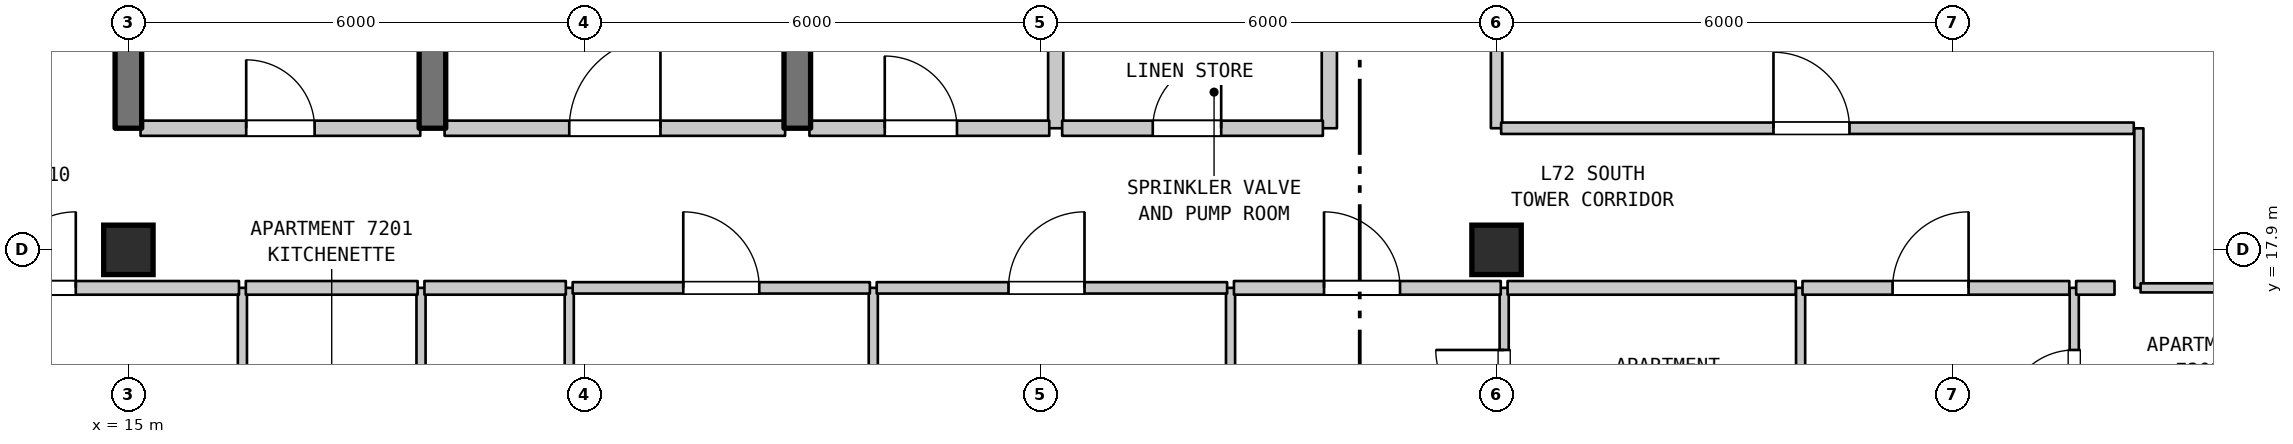
"""IFC4 building model, lengths in metres.
Left out: names, types, materials, properties, quantities, classifications, styles, units other than length and angle.
Written with IfcOpenShell. Run it as: python <this file> out.ifc"""

import sys

from ifc_helpers import new_model, si_unit, direction, frame, frame_2d, origin, origin_2d, place, context, subcontext, project, spatial, rectangle, extrude, element, fill, save


model = new_model("IFC4")
c1 = context("Model", 3, precision=1e-05, world=origin(), true_north=direction((0.0, 1.0)))
c2 = subcontext(c1, "Body", "Model", "MODEL_VIEW")
j1 = project(units=[si_unit("LENGTHUNIT", "METRE"), si_unit("PLANEANGLEUNIT", "RADIAN")], contexts=[c1])
p1 = place(None, origin())
s1 = spatial("IfcSite", under=j1, at=p1, CompositionType="ELEMENT")
p2 = place(p1, origin())
s2 = spatial("IfcBuilding", under=s1, at=p2, CompositionType="ELEMENT")
p3 = place(p2, frame((0.0, 0.0, 288.0)))
s3 = spatial("IfcBuildingStorey", under=s2, at=p3, CompositionType="ELEMENT", Elevation=288.0)
for number, where, z_axis, x_axis in (
    (1, (15.0, 17.9, 0.0), (0.0, 0.0, 1.0), (1.0, 0.0, 0.0)),
    (2, (33.0, 17.9, 0.0), (0.0, 0.0, 1.0), (1.0, 0.0, 0.0)),
):
    element("IfcColumn", number, at=place(p3, frame(where, z_axis=z_axis, x_axis=x_axis)), inside=s3, PredefinedType="COLUMN", context=c2, shape_type="SweptSolid", body=[
        extrude(rectangle(XDim=0.65, YDim=0.65, at=origin_2d()), origin(), (0.0, 0.0, 1.0), 3.7),
    ])
p4 = place(p3, frame((15.0, 19.5, 0.0), z_axis=(0.0, 0.0, 1.0), x_axis=(0.0, 1.0, 0.0)))
e3 = element("IfcWall", 3, at=p4, inside=s3, PredefinedType="SHEAR", context=c2, shape_type="SweptSolid", body=[
    extrude(rectangle(XDim=3.2, YDim=0.35, at=frame_2d((1.6, 0.0))), origin(), (0.0, 0.0, 1.0), 3.39),
])
p5 = place(p3, frame((16.5, 14.2, 0.0), z_axis=(0.0, 0.0, 1.0), x_axis=(0.0, 1.0, 0.0)))
e4 = element("IfcWall", 4, at=p5, inside=s3, PredefinedType="PARTITIONING", context=c2, shape_type="SweptSolid", body=[
    extrude(rectangle(XDim=3.2, YDim=0.12, at=frame_2d((1.6, 0.0))), origin(), (0.0, 0.0, 1.0), 3.39),
])
p6 = place(p5, frame((1.15, 0.0, 0.0)))
e5 = element("IfcOpeningElement", 5, at=p6, cuts=e4, PredefinedType="OPENING", context=c2, shape_type="SweptSolid", body=[
    extrude(rectangle(XDim=0.9, YDim=2.15, at=frame_2d((0.45, 1.075))), frame((0.0, 0.07, 0.0), z_axis=(0.0, -1.0, 0.0), x_axis=(1.0, 0.0, 0.0)), (0.0, 0.0, 1.0), 0.14),
])
p7 = place(p3, frame((18.85, 14.2, 0.0), z_axis=(0.0, 0.0, 1.0), x_axis=(0.0, 1.0, 0.0)))
e6 = element("IfcWall", 6, at=p7, inside=s3, PredefinedType="PARTITIONING", context=c2, shape_type="SweptSolid", body=[
    extrude(rectangle(XDim=3.2, YDim=0.12, at=frame_2d((1.6, 0.0))), origin(), (0.0, 0.0, 1.0), 3.39),
])
p8 = place(p3, frame((19.0, 19.5, 0.0), z_axis=(0.0, 0.0, 1.0), x_axis=(0.0, 1.0, 0.0)))
e7 = element("IfcWall", 7, at=p8, inside=s3, PredefinedType="SHEAR", context=c2, shape_type="SweptSolid", body=[
    extrude(rectangle(XDim=3.2, YDim=0.35, at=frame_2d((1.6, 0.0))), origin(), (0.0, 0.0, 1.0), 3.39),
])
p9 = place(p3, frame((20.8, 7.075, 0.0), z_axis=(0.0, 0.0, 1.0), x_axis=(0.0, 1.0, 0.0)))
e8 = element("IfcWall", 8, at=p9, inside=s3, PredefinedType="PARTITIONING", context=c2, shape_type="SweptSolid", body=[
    extrude(rectangle(XDim=10.325, YDim=0.12, at=frame_2d((5.163, 0.0))), origin(), (0.0, 0.0, 1.0), 3.39),
])
p10 = place(p3, frame((23.8, 19.5, 0.0), z_axis=(0.0, 0.0, 1.0), x_axis=(0.0, 1.0, 0.0)))
e9 = element("IfcWall", 9, at=p10, inside=s3, PredefinedType="SHEAR", context=c2, shape_type="SweptSolid", body=[
    extrude(rectangle(XDim=3.2, YDim=0.35, at=frame_2d((1.6, 0.0))), origin(), (0.0, 0.0, 1.0), 3.39),
])
p11 = place(p3, frame((24.8, 6.71, 0.0), z_axis=(0.0, 0.0, 1.0), x_axis=(0.0, 1.0, 0.0)))
e10 = element("IfcWall", 10, at=p11, inside=s3, PredefinedType="PARTITIONING", context=c2, shape_type="SweptSolid", body=[
    extrude(rectangle(XDim=10.69, YDim=0.12, at=frame_2d((5.345, 0.0))), origin(), (0.0, 0.0, 1.0), 3.39),
])
p12 = place(p3, frame((27.2, 19.5, 0.0), z_axis=(0.0, 0.0, 1.0), x_axis=(0.0, 1.0, 0.0)))
e11 = element("IfcWall", 11, at=p12, inside=s3, PredefinedType="STANDARD", context=c2, shape_type="SweptSolid", body=[
    extrude(rectangle(XDim=1.6, YDim=0.2, at=frame_2d((0.8, 0.0))), origin(), (0.0, 0.0, 1.0), 3.39),
])
p13 = place(p3, frame((29.5, 6.71, 0.0), z_axis=(0.0, 0.0, 1.0), x_axis=(0.0, 1.0, 0.0)))
e12 = element("IfcWall", 12, at=p13, inside=s3, PredefinedType="PARTITIONING", context=c2, shape_type="SweptSolid", body=[
    extrude(rectangle(XDim=10.69, YDim=0.12, at=frame_2d((5.345, 0.0))), origin(), (0.0, 0.0, 1.0), 3.39),
])
p14 = place(p3, frame((30.8, 19.5, 0.0), z_axis=(0.0, 0.0, 1.0), x_axis=(0.0, 1.0, 0.0)))
e13 = element("IfcWall", 13, at=p14, inside=s3, PredefinedType="STANDARD", context=c2, shape_type="SweptSolid", body=[
    extrude(rectangle(XDim=1.6, YDim=0.2, at=frame_2d((0.8, 0.0))), origin(), (0.0, 0.0, 1.0), 3.39),
])
p15 = place(p3, frame((33.0, 19.5, 0.0), z_axis=(0.0, 0.0, 1.0), x_axis=(0.0, 1.0, 0.0)))
e14 = element("IfcWall", 14, at=p15, inside=s3, PredefinedType="STANDARD", context=c2, shape_type="SweptSolid", body=[
    extrude(rectangle(XDim=8.4, YDim=0.15, at=frame_2d((4.2, 0.0))), origin(), (0.0, 0.0, 1.0), 3.1),
])
p16 = place(p3, frame((33.1, 15.008, 0.0), z_axis=(0.0, 0.0, 1.0), x_axis=(0.0, 1.0, 0.0)))
e15 = element("IfcWall", 15, at=p16, inside=s3, PredefinedType="PARTITIONING", context=c2, shape_type="SweptSolid", body=[
    extrude(rectangle(XDim=2.392, YDim=0.12, at=frame_2d((1.196, 0.0))), origin(), (0.0, 0.0, 1.0), 3.1),
])
p17 = place(p16, frame((0.675, 0.0, 0.0)))
e16 = element("IfcOpeningElement", 16, at=p17, cuts=e15, PredefinedType="OPENING", context=c2, shape_type="SweptSolid", body=[
    extrude(rectangle(XDim=0.9, YDim=2.1, at=frame_2d((0.45, 1.05))), frame((0.0, 0.07, 0.0), z_axis=(0.0, -1.0, 0.0), x_axis=(1.0, 0.0, 0.0)), (0.0, 0.0, 1.0), 0.14),
])
p18 = place(p3, frame((37.0, 15.008, 0.0), z_axis=(0.0, 0.0, 1.0), x_axis=(0.0, 1.0, 0.0)))
e17 = element("IfcWall", 17, at=p18, inside=s3, PredefinedType="PARTITIONING", context=c2, shape_type="SweptSolid", body=[
    extrude(rectangle(XDim=2.392, YDim=0.12, at=frame_2d((1.196, 0.0))), origin(), (0.0, 0.0, 1.0), 3.39),
])
p19 = place(p3, frame((40.6, 15.008, 0.0), z_axis=(0.0, 0.0, 1.0), x_axis=(0.0, 1.0, 0.0)))
e18 = element("IfcWall", 18, at=p19, inside=s3, PredefinedType="PARTITIONING", context=c2, shape_type="SweptSolid", body=[
    extrude(rectangle(XDim=2.392, YDim=0.12, at=frame_2d((1.196, 0.0))), origin(), (0.0, 0.0, 1.0), 3.39),
])
p20 = place(p19, frame((0.675, 0.0, 0.0)))
e19 = element("IfcOpeningElement", 19, at=p20, cuts=e18, PredefinedType="OPENING", context=c2, shape_type="SweptSolid", body=[
    extrude(rectangle(XDim=0.9, YDim=2.1, at=frame_2d((0.45, 1.05))), frame((0.0, 0.07, 0.0), z_axis=(0.0, -1.0, 0.0), x_axis=(1.0, 0.0, 0.0)), (0.0, 0.0, 1.0), 0.14),
])
p21 = place(p3, frame((41.45, 17.4, 0.0), z_axis=(0.0, 0.0, 1.0), x_axis=(0.0, 1.0, 0.0)))
e20 = element("IfcWall", 20, at=p21, inside=s3, PredefinedType="PARTITIONING", context=c2, shape_type="SweptSolid", body=[
    extrude(rectangle(XDim=2.099, YDim=0.12, at=frame_2d((1.05, 0.0))), origin(), (0.0, 0.0, 1.0), 3.39),
])
p22 = place(p3, frame((12.975, 17.4, 0.0), z_axis=(0.0, 0.0, 1.0), x_axis=(1.0, 0.0, 0.0)))
e21 = element("IfcWall", 21, at=p22, inside=s3, PredefinedType="STANDARD", context=c2, shape_type="SweptSolid", body=[
    extrude(rectangle(XDim=3.48, YDim=0.18, at=frame_2d((1.74, 0.0))), origin(), (0.0, 0.0, 1.0), 3.39),
])
p23 = place(p22, frame((0.333, 0.0, 0.0)))
e22 = element("IfcOpeningElement", 22, at=p23, cuts=e21, PredefinedType="OPENING", context=c2, shape_type="SweptSolid", body=[
    extrude(rectangle(XDim=1.0, YDim=2.15, at=frame_2d((0.5, 1.075))), frame((0.0, 0.1, 0.0), z_axis=(0.0, -1.0, 0.0), x_axis=(1.0, 0.0, 0.0)), (0.0, 0.0, 1.0), 0.2),
])
p24 = place(p3, frame((16.545, 17.4, 0.0), z_axis=(0.0, 0.0, 1.0), x_axis=(1.0, 0.0, 0.0)))
e23 = element("IfcWall", 23, at=p24, inside=s3, PredefinedType="STANDARD", context=c2, shape_type="SweptSolid", body=[
    extrude(rectangle(XDim=2.26, YDim=0.18, at=frame_2d((1.13, 0.0))), origin(), (0.0, 0.0, 1.0), 3.39),
])
p25 = place(p3, frame((18.895, 17.4, 0.0), z_axis=(0.0, 0.0, 1.0), x_axis=(1.0, 0.0, 0.0)))
e24 = element("IfcWall", 24, at=p25, inside=s3, PredefinedType="STANDARD", context=c2, shape_type="SweptSolid", body=[
    extrude(rectangle(XDim=1.86, YDim=0.18, at=frame_2d((0.93, 0.0))), origin(), (0.0, 0.0, 1.0), 3.39),
])
p26 = place(p3, frame((20.845, 17.4, 0.0), z_axis=(0.0, 0.0, 1.0), x_axis=(1.0, 0.0, 0.0)))
e25 = element("IfcWall", 25, at=p26, inside=s3, PredefinedType="STANDARD", context=c2, shape_type="SweptSolid", body=[
    extrude(rectangle(XDim=3.91, YDim=0.15, at=frame_2d((1.955, 0.0))), origin(), (0.0, 0.0, 1.0), 3.39),
])
p27 = place(p26, frame((1.455, 0.0, 0.0)))
e26 = element("IfcOpeningElement", 26, at=p27, cuts=e25, PredefinedType="OPENING", context=c2, shape_type="SweptSolid", body=[
    extrude(rectangle(XDim=1.0, YDim=2.15, at=frame_2d((0.5, 1.075))), frame((0.0, 0.085, 0.0), z_axis=(0.0, -1.0, 0.0), x_axis=(1.0, 0.0, 0.0)), (0.0, 0.0, 1.0), 0.17),
])
p28 = place(p3, frame((24.845, 17.4, 0.0), z_axis=(0.0, 0.0, 1.0), x_axis=(1.0, 0.0, 0.0)))
e27 = element("IfcWall", 27, at=p28, inside=s3, PredefinedType="STANDARD", context=c2, shape_type="SweptSolid", body=[
    extrude(rectangle(XDim=4.61, YDim=0.15, at=frame_2d((2.305, 0.0))), origin(), (0.0, 0.0, 1.0), 3.39),
])
p29 = place(p28, frame((1.734, 0.0, 0.0)))
e28 = element("IfcOpeningElement", 28, at=p29, cuts=e27, PredefinedType="OPENING", context=c2, shape_type="SweptSolid", body=[
    extrude(rectangle(XDim=1.0, YDim=2.15, at=frame_2d((0.5, 1.075))), frame((0.0, 0.085, 0.0), z_axis=(0.0, -1.0, 0.0), x_axis=(1.0, 0.0, 0.0)), (0.0, 0.0, 1.0), 0.17),
])
p30 = place(p3, frame((29.545, 17.4, 0.0), z_axis=(0.0, 0.0, 1.0), x_axis=(1.0, 0.0, 0.0)))
e29 = element("IfcWall", 29, at=p30, inside=s3, PredefinedType="STANDARD", context=c2, shape_type="SweptSolid", body=[
    extrude(rectangle(XDim=3.51, YDim=0.18, at=frame_2d((1.755, 0.0))), origin(), (0.0, 0.0, 1.0), 3.39),
])
p31 = place(p30, frame((1.185, 0.0, 0.0)))
e30 = element("IfcOpeningElement", 30, at=p31, cuts=e29, PredefinedType="OPENING", context=c2, shape_type="SweptSolid", body=[
    extrude(rectangle(XDim=1.0, YDim=2.15, at=frame_2d((0.5, 1.075))), frame((0.0, 0.1, 0.0), z_axis=(0.0, -1.0, 0.0), x_axis=(1.0, 0.0, 0.0)), (0.0, 0.0, 1.0), 0.2),
])
p32 = place(p3, frame((33.145, 17.4, 0.0), z_axis=(0.0, 0.0, 1.0), x_axis=(1.0, 0.0, 0.0)))
e31 = element("IfcWall", 31, at=p32, inside=s3, PredefinedType="STANDARD", context=c2, shape_type="SweptSolid", body=[
    extrude(rectangle(XDim=3.79, YDim=0.18, at=frame_2d((1.895, 0.0))), origin(), (0.0, 0.0, 1.0), 3.39),
])
p33 = place(p3, frame((37.025, 17.4, 0.0), z_axis=(0.0, 0.0, 1.0), x_axis=(1.0, 0.0, 0.0)))
e32 = element("IfcWall", 32, at=p33, inside=s3, PredefinedType="STANDARD", context=c2, shape_type="SweptSolid", body=[
    extrude(rectangle(XDim=3.51, YDim=0.18, at=frame_2d((1.755, 0.0))), origin(), (0.0, 0.0, 1.0), 3.39),
])
p34 = place(p33, frame((1.185, 0.0, 0.0)))
e33 = element("IfcOpeningElement", 33, at=p34, cuts=e32, PredefinedType="OPENING", context=c2, shape_type="SweptSolid", body=[
    extrude(rectangle(XDim=1.0, YDim=2.15, at=frame_2d((0.5, 1.075))), frame((0.0, 0.1, 0.0), z_axis=(0.0, -1.0, 0.0), x_axis=(1.0, 0.0, 0.0)), (0.0, 0.0, 1.0), 0.2),
])
p35 = place(p3, frame((40.625, 17.4, 0.0), z_axis=(0.0, 0.0, 1.0), x_axis=(1.0, 0.0, 0.0)))
e34 = element("IfcWall", 34, at=p35, inside=s3, PredefinedType="STANDARD", context=c2, shape_type="SweptSolid", body=[
    extrude(rectangle(XDim=0.505, YDim=0.18, at=frame_2d((0.252, 0.0))), origin(), (0.0, 0.0, 1.0), 3.39),
])
p36 = place(p3, frame((41.473, 17.4, 0.0), z_axis=(0.0, 0.0, 1.0), x_axis=(1.0, 0.0, 0.0)))
e35 = element("IfcWall", 35, at=p36, inside=s3, PredefinedType="PARTITIONING", context=c2, shape_type="SweptSolid", body=[
    extrude(rectangle(XDim=2.031, YDim=0.12, at=frame_2d((1.016, 0.0))), origin(), (0.0, 0.0, 1.0), 3.39),
])
p37 = place(p3, frame((15.16, 19.5, 0.0), z_axis=(0.0, 0.0, 1.0), x_axis=(1.0, 0.0, 0.0)))
e36 = element("IfcWall", 36, at=p37, inside=s3, PredefinedType="STANDARD", context=c2, shape_type="SweptSolid", body=[
    extrude(rectangle(XDim=3.68, YDim=0.2, at=frame_2d((1.84, 0.0))), origin(), (0.0, 0.0, 1.0), 3.39),
])
p38 = place(p37, frame((1.39, 0.0, 0.0)))
e37 = element("IfcOpeningElement", 37, at=p38, cuts=e36, PredefinedType="OPENING", context=c2, shape_type="SweptSolid", body=[
    extrude(rectangle(XDim=0.9, YDim=2.15, at=frame_2d((0.45, 1.075))), frame((0.0, 0.11, 0.0), z_axis=(0.0, -1.0, 0.0), x_axis=(1.0, 0.0, 0.0)), (0.0, 0.0, 1.0), 0.22),
])
p39 = place(p3, frame((19.16, 19.5, 0.0), z_axis=(0.0, 0.0, 1.0), x_axis=(1.0, 0.0, 0.0)))
e38 = element("IfcWall", 38, at=p39, inside=s3, PredefinedType="STANDARD", context=c2, shape_type="SweptSolid", body=[
    extrude(rectangle(XDim=4.48, YDim=0.2, at=frame_2d((2.24, 0.0))), origin(), (0.0, 0.0, 1.0), 3.39),
])
p40 = place(p39, frame((1.64, 0.0, 0.0)))
e39 = element("IfcOpeningElement", 39, at=p40, cuts=e38, PredefinedType="OPENING", context=c2, shape_type="SweptSolid", body=[
    extrude(rectangle(XDim=1.2, YDim=2.2, at=frame_2d((0.6, 1.1))), frame((0.0, 0.11, 0.0), z_axis=(0.0, -1.0, 0.0), x_axis=(1.0, 0.0, 0.0)), (0.0, 0.0, 1.0), 0.22),
])
p41 = place(p3, frame((23.96, 19.5, 0.0), z_axis=(0.0, 0.0, 1.0), x_axis=(1.0, 0.0, 0.0)))
e40 = element("IfcWall", 40, at=p41, inside=s3, PredefinedType="STANDARD", context=c2, shape_type="SweptSolid", body=[
    extrude(rectangle(XDim=3.155, YDim=0.2, at=frame_2d((1.578, 0.0))), origin(), (0.0, 0.0, 1.0), 3.39),
])
p42 = place(p41, frame((0.991, 0.0, 0.0)))
e41 = element("IfcOpeningElement", 41, at=p42, cuts=e40, PredefinedType="OPENING", context=c2, shape_type="SweptSolid", body=[
    extrude(rectangle(XDim=0.95, YDim=2.15, at=frame_2d((0.475, 1.075))), frame((0.0, 0.11, 0.0), z_axis=(0.0, -1.0, 0.0), x_axis=(1.0, 0.0, 0.0)), (0.0, 0.0, 1.0), 0.22),
])
p43 = place(p3, frame((27.285, 19.5, 0.0), z_axis=(0.0, 0.0, 1.0), x_axis=(1.0, 0.0, 0.0)))
e42 = element("IfcWall", 42, at=p43, inside=s3, PredefinedType="STANDARD", context=c2, shape_type="SweptSolid", body=[
    extrude(rectangle(XDim=3.43, YDim=0.2, at=frame_2d((1.715, 0.0))), origin(), (0.0, 0.0, 1.0), 3.39),
])
p44 = place(p43, frame((1.192, 0.0, 0.0)))
e43 = element("IfcOpeningElement", 43, at=p44, cuts=e42, PredefinedType="OPENING", context=c2, shape_type="SweptSolid", body=[
    extrude(rectangle(XDim=0.9, YDim=2.15, at=frame_2d((0.45, 1.075))), frame((0.0, 0.11, 0.0), z_axis=(0.0, -1.0, 0.0), x_axis=(1.0, 0.0, 0.0)), (0.0, 0.0, 1.0), 0.22),
])
p45 = place(p3, frame((33.06, 19.5, 0.0), z_axis=(0.0, 0.0, 1.0), x_axis=(1.0, 0.0, 0.0)))
e44 = element("IfcWall", 44, at=p45, inside=s3, PredefinedType="STANDARD", context=c2, shape_type="SweptSolid", body=[
    extrude(rectangle(XDim=8.323, YDim=0.15, at=frame_2d((4.162, 0.0))), origin(), (0.0, 0.0, 1.0), 3.39),
])
p46 = place(p45, frame((3.583, 0.0, 0.0)))
e45 = element("IfcOpeningElement", 45, at=p46, cuts=e44, PredefinedType="OPENING", context=c2, shape_type="SweptSolid", body=[
    extrude(rectangle(XDim=1.0, YDim=2.15, at=frame_2d((0.5, 1.075))), frame((0.0, 0.085, 0.0), z_axis=(0.0, -1.0, 0.0), x_axis=(1.0, 0.0, 0.0)), (0.0, 0.0, 1.0), 0.17),
])
p47 = place(p17, origin())
e46 = element("IfcDoor", 46, at=p47, inside=s3, OperationType="SINGLE_SWING_RIGHT", PredefinedType="DOOR", context=c2, shape_type="SweptSolid", body=[
    extrude(rectangle(XDim=0.9, YDim=2.1, at=frame_2d((0.45, 1.05))), frame((0.0, 0.025, 0.0), z_axis=(0.0, -1.0, 0.0), x_axis=(1.0, 0.0, 0.0)), (0.0, 0.0, 1.0), 0.05),
])
fill(e16, e46)
p48 = place(p20, origin())
e47 = element("IfcDoor", 47, at=p48, inside=s3, OperationType="SINGLE_SWING_LEFT", PredefinedType="DOOR", context=c2, shape_type="SweptSolid", body=[
    extrude(rectangle(XDim=0.9, YDim=2.1, at=frame_2d((0.45, 1.05))), frame((0.0, 0.025, 0.0), z_axis=(0.0, -1.0, 0.0), x_axis=(1.0, 0.0, 0.0)), (0.0, 0.0, 1.0), 0.05),
])
fill(e19, e47)
p49 = place(p23, origin())
e48 = element("IfcDoor", 48, at=p49, inside=s3, OperationType="SINGLE_SWING_RIGHT", PredefinedType="DOOR", context=c2, shape_type="SweptSolid", body=[
    extrude(rectangle(XDim=1.0, YDim=2.15, at=frame_2d((0.5, 1.075))), frame((0.0, 0.025, 0.0), z_axis=(0.0, -1.0, 0.0), x_axis=(1.0, 0.0, 0.0)), (0.0, 0.0, 1.0), 0.05),
])
fill(e22, e48)
p50 = place(p27, origin())
e49 = element("IfcDoor", 49, at=p50, inside=s3, OperationType="SINGLE_SWING_LEFT", PredefinedType="DOOR", context=c2, shape_type="SweptSolid", body=[
    extrude(rectangle(XDim=1.0, YDim=2.15, at=frame_2d((0.5, 1.075))), frame((0.0, 0.025, 0.0), z_axis=(0.0, -1.0, 0.0), x_axis=(1.0, 0.0, 0.0)), (0.0, 0.0, 1.0), 0.05),
])
fill(e26, e49)
p51 = place(p29, origin())
e50 = element("IfcDoor", 50, at=p51, inside=s3, OperationType="SINGLE_SWING_RIGHT", PredefinedType="DOOR", context=c2, shape_type="SweptSolid", body=[
    extrude(rectangle(XDim=1.0, YDim=2.15, at=frame_2d((0.5, 1.075))), frame((0.0, 0.025, 0.0), z_axis=(0.0, -1.0, 0.0), x_axis=(1.0, 0.0, 0.0)), (0.0, 0.0, 1.0), 0.05),
])
fill(e28, e50)
p52 = place(p31, origin())
e51 = element("IfcDoor", 51, at=p52, inside=s3, OperationType="SINGLE_SWING_LEFT", PredefinedType="DOOR", context=c2, shape_type="SweptSolid", body=[
    extrude(rectangle(XDim=1.0, YDim=2.15, at=frame_2d((0.5, 1.075))), frame((0.0, 0.025, 0.0), z_axis=(0.0, -1.0, 0.0), x_axis=(1.0, 0.0, 0.0)), (0.0, 0.0, 1.0), 0.05),
])
fill(e30, e51)
p53 = place(p34, origin())
e52 = element("IfcDoor", 52, at=p53, inside=s3, OperationType="SINGLE_SWING_RIGHT", PredefinedType="DOOR", context=c2, shape_type="SweptSolid", body=[
    extrude(rectangle(XDim=1.0, YDim=2.15, at=frame_2d((0.5, 1.075))), frame((0.0, 0.025, 0.0), z_axis=(0.0, -1.0, 0.0), x_axis=(1.0, 0.0, 0.0)), (0.0, 0.0, 1.0), 0.05),
])
fill(e33, e52)
p54 = place(p38, origin())
e53 = element("IfcDoor", 53, at=p54, inside=s3, OperationType="SINGLE_SWING_LEFT", PredefinedType="DOOR", context=c2, shape_type="SweptSolid", body=[
    extrude(rectangle(XDim=0.9, YDim=2.15, at=frame_2d((0.45, 1.075))), frame((0.0, 0.025, 0.0), z_axis=(0.0, -1.0, 0.0), x_axis=(1.0, 0.0, 0.0)), (0.0, 0.0, 1.0), 0.05),
])
fill(e37, e53)
p55 = place(p40, origin())
e54 = element("IfcDoor", 54, at=p55, inside=s3, OperationType="SINGLE_SWING_RIGHT", PredefinedType="DOOR", context=c2, shape_type="SweptSolid", body=[
    extrude(rectangle(XDim=1.2, YDim=2.2, at=frame_2d((0.6, 1.1))), frame((0.0, 0.025, 0.0), z_axis=(0.0, -1.0, 0.0), x_axis=(1.0, 0.0, 0.0)), (0.0, 0.0, 1.0), 0.05),
])
fill(e39, e54)
p56 = place(p42, origin())
e55 = element("IfcDoor", 55, at=p56, inside=s3, OperationType="SINGLE_SWING_LEFT", PredefinedType="DOOR", context=c2, shape_type="SweptSolid", body=[
    extrude(rectangle(XDim=0.95, YDim=2.15, at=frame_2d((0.475, 1.075))), frame((0.0, 0.025, 0.0), z_axis=(0.0, -1.0, 0.0), x_axis=(1.0, 0.0, 0.0)), (0.0, 0.0, 1.0), 0.05),
])
fill(e41, e55)
p57 = place(p44, origin())
e56 = element("IfcDoor", 56, at=p57, inside=s3, OperationType="SINGLE_SWING_RIGHT", PredefinedType="DOOR", context=c2, shape_type="SweptSolid", body=[
    extrude(rectangle(XDim=0.9, YDim=2.15, at=frame_2d((0.45, 1.075))), frame((0.0, 0.025, 0.0), z_axis=(0.0, -1.0, 0.0), x_axis=(1.0, 0.0, 0.0)), (0.0, 0.0, 1.0), 0.05),
])
fill(e43, e56)
p58 = place(p46, origin())
e57 = element("IfcDoor", 57, at=p58, inside=s3, OperationType="SINGLE_SWING_LEFT", PredefinedType="DOOR", context=c2, shape_type="SweptSolid", body=[
    extrude(rectangle(XDim=1.0, YDim=2.15, at=frame_2d((0.5, 1.075))), frame((0.0, 0.025, 0.0), z_axis=(0.0, -1.0, 0.0), x_axis=(1.0, 0.0, 0.0)), (0.0, 0.0, 1.0), 0.05),
])
fill(e45, e57)
save(model, sys.argv[1])
